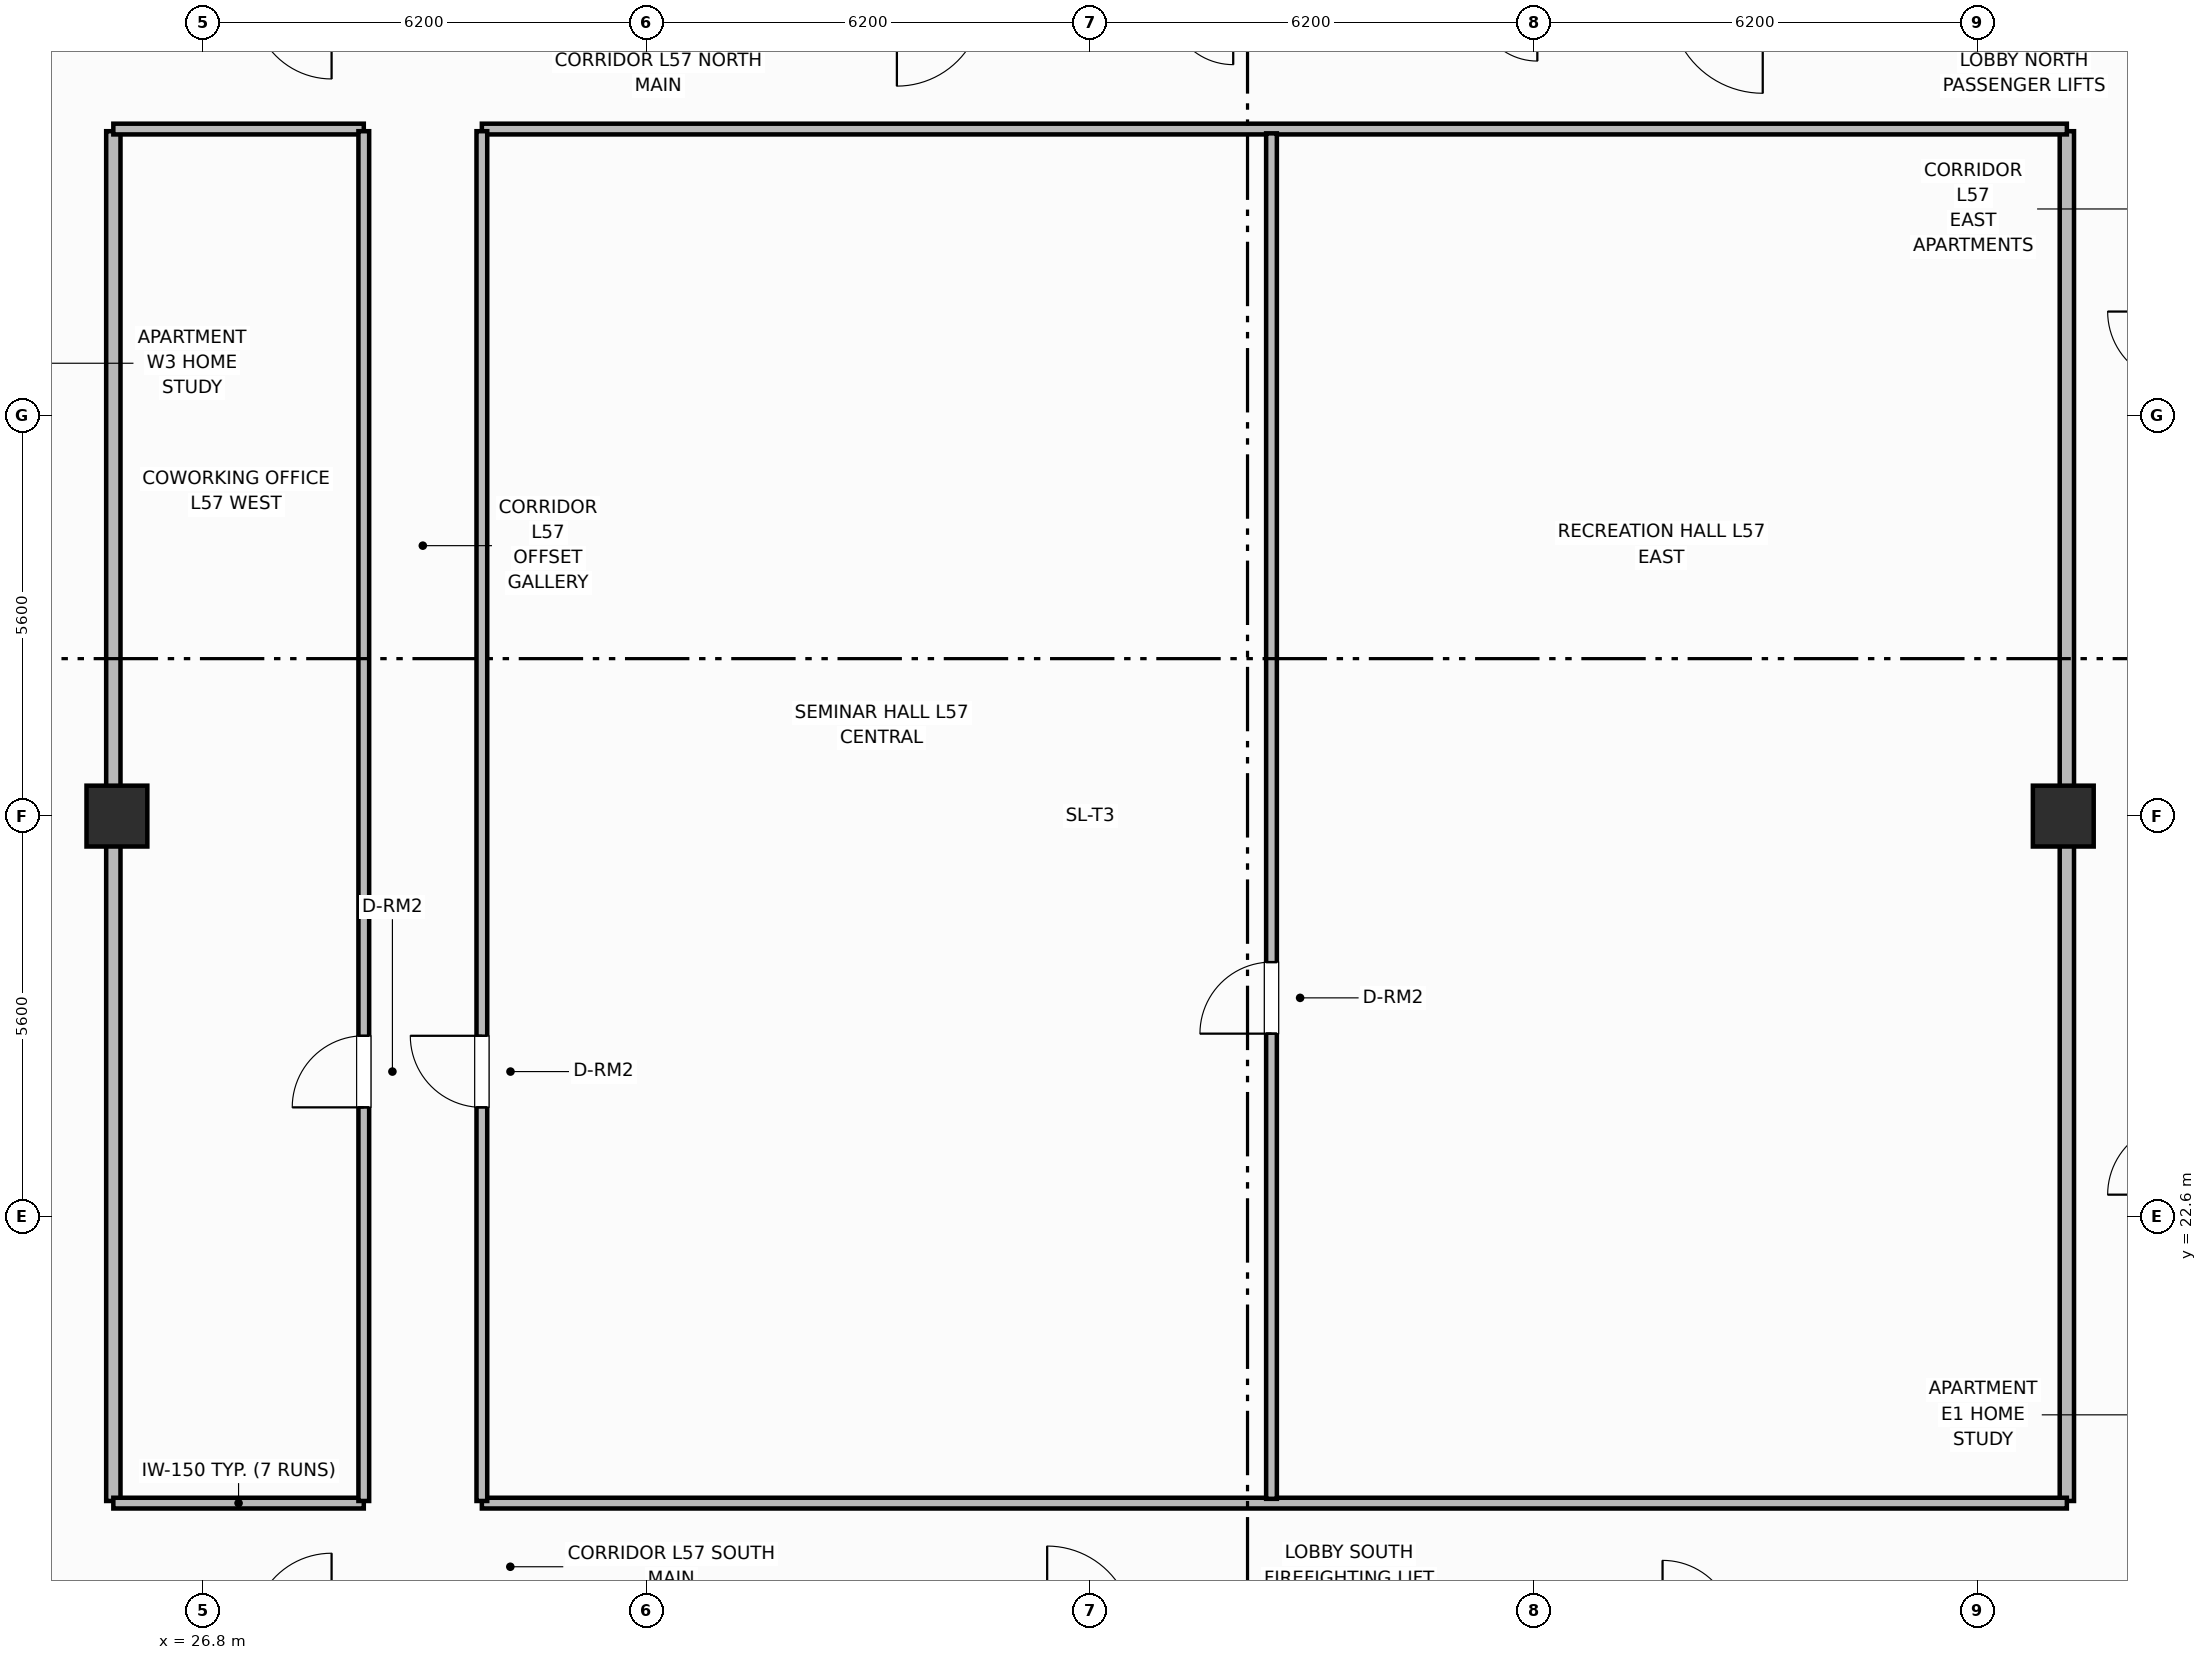
"""IFC4 building model, lengths in metres.
Left out: names, types, materials, properties, quantities, classifications, styles, units other than length and angle.
Written with IfcOpenShell. Run it as: python <this file> out.ifc"""

import sys

from ifc_helpers import new_model, si_unit, direction, frame, frame_2d, origin, origin_2d, place, context, subcontext, project, spatial, rectangle, extrude, element, fill, save


model = new_model("IFC4")
c1 = context("Model", 3, precision=1e-05, world=origin(), true_north=direction((0.0, 1.0)))
c2 = subcontext(c1, "Body", "Model", "MODEL_VIEW")
j1 = project(units=[si_unit("LENGTHUNIT", "METRE"), si_unit("PLANEANGLEUNIT", "RADIAN")], contexts=[c1])
p1 = place(None, origin())
s1 = spatial("IfcSite", under=j1, at=p1, CompositionType="ELEMENT")
p2 = place(p1, origin())
s2 = spatial("IfcBuilding", under=s1, at=p2, CompositionType="ELEMENT")
p3 = place(p2, frame((0.0, 0.0, 229.5)))
s3 = spatial("IfcBuildingStorey", under=s2, at=p3, CompositionType="ELEMENT", Elevation=229.5)
for number, where, z_axis, x_axis in (
    (1, (25.6, 28.2, 0.0), (0.0, 0.0, 1.0), (1.0, 0.0, 0.0)),
    (2, (52.8, 28.2, 0.0), (0.0, 0.0, 1.0), (1.0, 0.0, 0.0)),
):
    element("IfcColumn", number, at=place(p3, frame(where, z_axis=z_axis, x_axis=x_axis)), inside=s3, PredefinedType="COLUMN", context=c2, shape_type="SweptSolid", body=[
        extrude(rectangle(XDim=0.85, YDim=0.85, at=origin_2d()), origin(), (0.0, 0.0, 1.0), 3.7),
    ])
for number, where, z_axis, x_axis in (
    (3, (25.55, 18.63, 0.0), (0.0, 0.0, 1.0), (0.0, 1.0, 0.0)),
    (4, (52.85, 18.63, 0.0), (0.0, 0.0, 1.0), (0.0, 1.0, 0.0)),
):
    element("IfcWall", number, at=place(p3, frame(where, z_axis=z_axis, x_axis=x_axis)), inside=s3, PredefinedType="PARTITIONING", context=c2, shape_type="SweptSolid", body=[
        extrude(rectangle(XDim=19.14, YDim=0.2, at=frame_2d((9.57, 0.0))), origin(), (0.0, 0.0, 1.0), 2.56),
    ])
p4 = place(p3, frame((25.55, 18.6, 0.0), z_axis=(0.0, 0.0, 1.0), x_axis=(1.0, 0.0, 0.0)))
e5 = element("IfcWall", 5, at=p4, inside=s3, PredefinedType="PARTITIONING", context=c2, shape_type="SweptSolid", body=[
    extrude(rectangle(XDim=3.5, YDim=0.15, at=frame_2d((1.75, 0.0))), origin(), (0.0, 0.0, 1.0), 2.56),
])
p5 = place(p3, frame((30.7, 18.6, 0.0), z_axis=(0.0, 0.0, 1.0), x_axis=(1.0, 0.0, 0.0)))
e6 = element("IfcWall", 6, at=p5, inside=s3, PredefinedType="PARTITIONING", context=c2, shape_type="SweptSolid", body=[
    extrude(rectangle(XDim=22.15, YDim=0.15, at=frame_2d((11.075, 0.0))), origin(), (0.0, 0.0, 1.0), 2.56),
])
p6 = place(p3, frame((25.55, 37.8, 0.0), z_axis=(0.0, 0.0, 1.0), x_axis=(1.0, 0.0, 0.0)))
e7 = element("IfcWall", 7, at=p6, inside=s3, PredefinedType="PARTITIONING", context=c2, shape_type="SweptSolid", body=[
    extrude(rectangle(XDim=3.5, YDim=0.15, at=frame_2d((1.75, 0.0))), origin(), (0.0, 0.0, 1.0), 2.56),
])
p7 = place(p3, frame((30.7, 37.8, 0.0), z_axis=(0.0, 0.0, 1.0), x_axis=(1.0, 0.0, 0.0)))
e8 = element("IfcWall", 8, at=p7, inside=s3, PredefinedType="PARTITIONING", context=c2, shape_type="SweptSolid", body=[
    extrude(rectangle(XDim=22.15, YDim=0.15, at=frame_2d((11.075, 0.0))), origin(), (0.0, 0.0, 1.0), 2.56),
])
p8 = place(p3, frame((41.735, 18.66, 0.0), z_axis=(0.0, 0.0, 1.0), x_axis=(0.0, 1.0, 0.0)))
e9 = element("IfcWall", 9, at=p8, inside=s3, PredefinedType="PARTITIONING", context=c2, shape_type="SweptSolid", body=[
    extrude(rectangle(XDim=19.08, YDim=0.15, at=frame_2d((9.54, 0.0))), origin(), (0.0, 0.0, 1.0), 2.56),
])
p9 = place(p8, frame((6.5, 0.0, 0.0)))
e10 = element("IfcOpeningElement", 10, at=p9, cuts=e9, PredefinedType="OPENING", context=c2, shape_type="SweptSolid", body=[
    extrude(rectangle(XDim=1.0, YDim=2.15, at=frame_2d((0.5, 1.075))), frame((0.0, 0.085, 0.0), z_axis=(0.0, -1.0, 0.0), x_axis=(1.0, 0.0, 0.0)), (0.0, 0.0, 1.0), 0.17),
])
p10 = place(p3, frame((29.05, 18.63, 0.0), z_axis=(0.0, 0.0, 1.0), x_axis=(0.0, 1.0, 0.0)))
e11 = element("IfcWall", 11, at=p10, inside=s3, PredefinedType="PARTITIONING", context=c2, shape_type="SweptSolid", body=[
    extrude(rectangle(XDim=19.14, YDim=0.15, at=frame_2d((9.57, 0.0))), origin(), (0.0, 0.0, 1.0), 2.56),
])
p11 = place(p10, frame((5.5, 0.0, 0.0)))
e12 = element("IfcOpeningElement", 12, at=p11, cuts=e11, PredefinedType="OPENING", context=c2, shape_type="SweptSolid", body=[
    extrude(rectangle(XDim=1.0, YDim=2.15, at=frame_2d((0.5, 1.075))), frame((0.0, 0.085, 0.0), z_axis=(0.0, -1.0, 0.0), x_axis=(1.0, 0.0, 0.0)), (0.0, 0.0, 1.0), 0.17),
])
p12 = place(p3, frame((30.7, 18.63, 0.0), z_axis=(0.0, 0.0, 1.0), x_axis=(0.0, 1.0, 0.0)))
e13 = element("IfcWall", 13, at=p12, inside=s3, PredefinedType="PARTITIONING", context=c2, shape_type="SweptSolid", body=[
    extrude(rectangle(XDim=19.14, YDim=0.15, at=frame_2d((9.57, 0.0))), origin(), (0.0, 0.0, 1.0), 2.56),
])
p13 = place(p12, frame((5.5, 0.0, 0.0)))
e14 = element("IfcOpeningElement", 14, at=p13, cuts=e13, PredefinedType="OPENING", context=c2, shape_type="SweptSolid", body=[
    extrude(rectangle(XDim=1.0, YDim=2.15, at=frame_2d((0.5, 1.075))), frame((0.0, 0.085, 0.0), z_axis=(0.0, -1.0, 0.0), x_axis=(1.0, 0.0, 0.0)), (0.0, 0.0, 1.0), 0.17),
])
p14 = place(p9, origin())
e15 = element("IfcDoor", 15, at=p14, inside=s3, OperationType="SINGLE_SWING_LEFT", PredefinedType="DOOR", context=c2, shape_type="SweptSolid", body=[
    extrude(rectangle(XDim=1.0, YDim=2.15, at=frame_2d((0.5, 1.075))), frame((0.0, 0.025, 0.0), z_axis=(0.0, -1.0, 0.0), x_axis=(1.0, 0.0, 0.0)), (0.0, 0.0, 1.0), 0.05),
])
fill(e10, e15)
p15 = place(p11, origin())
e16 = element("IfcDoor", 16, at=p15, inside=s3, OperationType="SINGLE_SWING_LEFT", PredefinedType="DOOR", context=c2, shape_type="SweptSolid", body=[
    extrude(rectangle(XDim=1.0, YDim=2.15, at=frame_2d((0.5, 1.075))), frame((0.0, 0.025, 0.0), z_axis=(0.0, -1.0, 0.0), x_axis=(1.0, 0.0, 0.0)), (0.0, 0.0, 1.0), 0.05),
])
fill(e12, e16)
p16 = place(p13, origin())
e17 = element("IfcDoor", 17, at=p16, inside=s3, OperationType="SINGLE_SWING_RIGHT", PredefinedType="DOOR", context=c2, shape_type="SweptSolid", body=[
    extrude(rectangle(XDim=1.0, YDim=2.15, at=frame_2d((0.5, 1.075))), frame((0.0, 0.025, 0.0), z_axis=(0.0, -1.0, 0.0), x_axis=(1.0, 0.0, 0.0)), (0.0, 0.0, 1.0), 0.05),
])
fill(e14, e17)
save(model, sys.argv[1])
